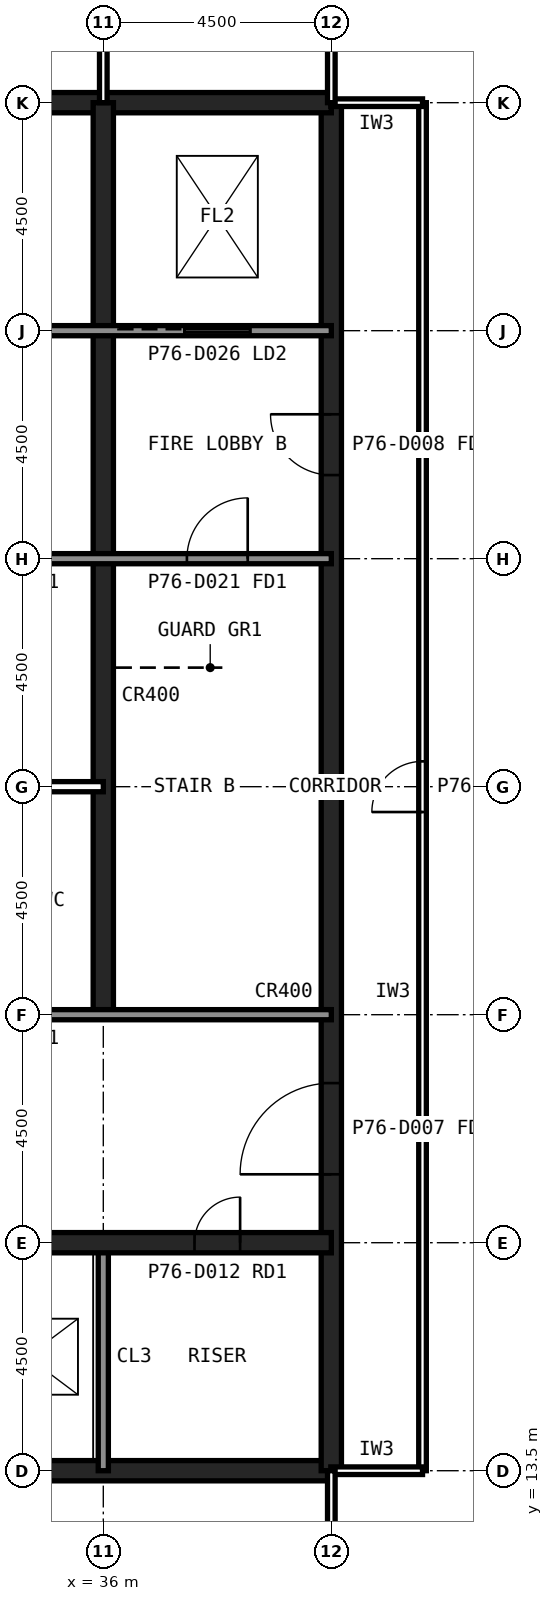
"""IFC4 building model, lengths in metres.
Left out: names, types, materials, properties, quantities, classifications, styles, units other than length and angle.
Written with IfcOpenShell. Run it as: python <this file> out.ifc"""

import sys

from ifc_helpers import new_model, si_unit, direction, frame, frame_2d, origin, place, context, subcontext, project, spatial, polyline, rectangle, outline, extrude, element, fill, save


model = new_model("IFC4")
c1 = context("Model", 3, precision=1e-05, world=origin(), true_north=direction((0.0, 1.0)))
c2 = subcontext(c1, "Body", "Model", "MODEL_VIEW")
j1 = project(units=[si_unit("LENGTHUNIT", "METRE"), si_unit("PLANEANGLEUNIT", "RADIAN")], contexts=[c1])
p1 = place(None, origin())
s1 = spatial("IfcSite", under=j1, at=p1, CompositionType="ELEMENT")
p2 = place(p1, origin())
s2 = spatial("IfcBuilding", under=s1, at=p2, CompositionType="ELEMENT")
p3 = place(p2, frame((0.0, 0.0, 320.1)))
s3 = spatial("IfcBuildingStorey", under=s2, at=p3, CompositionType="ELEMENT", Elevation=320.1)
p4 = place(p3, frame((13.5, 13.5, 0.0), z_axis=(0.0, 0.0, 1.0), x_axis=(1.0, 0.0, 0.0)))
e1 = element("IfcWall", 1, at=p4, inside=s3, PredefinedType="SHEAR", context=c2, shape_type="SweptSolid", body=[
    extrude(rectangle(XDim=27.0, YDim=0.4, at=frame_2d((13.5, 0.0))), origin(), (0.0, 0.0, 1.0), 9.277),
])
p5 = place(p3, frame((40.5, 13.5, 0.0), z_axis=(0.0, 0.0, 1.0), x_axis=(0.0, 1.0, 0.0)))
e2 = element("IfcWall", 2, at=p5, inside=s3, PredefinedType="SHEAR", context=c2, shape_type="SweptSolid", body=[
    extrude(outline(polyline([(0.0, 0.0), (27.0, 0.0), (27.0, 17.377), (0.0, 9.277), (0.0, 0.0)])), frame((0.0, 0.2, 0.0), z_axis=(0.0, -1.0, 0.0), x_axis=(1.0, 0.0, 0.0)), (0.0, 0.0, 1.0), 0.4),
])
p6 = place(p5, frame((5.85, 0.0, 0.0)))
e3 = element("IfcOpeningElement", 3, at=p6, cuts=e2, PredefinedType="OPENING", context=c2, shape_type="SweptSolid", body=[
    extrude(rectangle(XDim=1.8, YDim=2.1, at=frame_2d((0.9, 1.05))), frame((0.0, 0.21, 0.0), z_axis=(0.0, -1.0, 0.0), x_axis=(1.0, 0.0, 0.0)), (0.0, 0.0, 1.0), 0.42),
])
p7 = place(p5, frame((19.65, 0.0, 0.0)))
e4 = element("IfcOpeningElement", 4, at=p7, cuts=e2, PredefinedType="OPENING", context=c2, shape_type="SweptSolid", body=[
    extrude(rectangle(XDim=1.2, YDim=2.1, at=frame_2d((0.6, 1.05))), frame((0.0, 0.21, 0.0), z_axis=(0.0, -1.0, 0.0), x_axis=(1.0, 0.0, 0.0)), (0.0, 0.0, 1.0), 0.42),
])
p8 = place(p3, frame((40.5, 40.5, 0.0), z_axis=(0.0, 0.0, 1.0), x_axis=(-1.0, 0.0, 0.0)))
e5 = element("IfcWall", 5, at=p8, inside=s3, PredefinedType="SHEAR", context=c2, shape_type="SweptSolid", body=[
    extrude(rectangle(XDim=27.0, YDim=0.4, at=frame_2d((13.5, 0.0))), origin(), (0.0, 0.0, 1.0), 17.377),
])
p9 = place(p3, frame((36.0, 13.5, 0.0), z_axis=(0.0, 0.0, 1.0), x_axis=(0.0, 1.0, 0.0)))
e6 = element("IfcWall", 6, at=p9, inside=s3, PredefinedType="SOLIDWALL", context=c2, shape_type="SweptSolid", body=[
    extrude(outline(polyline([(0.0, 0.0), (4.5, 0.0), (4.5, 10.477), (0.0, 9.127), (0.0, 0.0)])), frame((0.0, 0.1, 0.0), z_axis=(0.0, -1.0, 0.0), x_axis=(1.0, 0.0, 0.0)), (0.0, 0.0, 1.0), 0.2),
])
p10 = place(p3, frame((36.0, 22.5, 0.0), z_axis=(0.0, 0.0, 1.0), x_axis=(0.0, 1.0, 0.0)))
e7 = element("IfcWall", 7, at=p10, inside=s3, PredefinedType="SHEAR", context=c2, shape_type="SweptSolid", body=[
    extrude(outline(polyline([(0.0, 0.0), (18.0, 0.0), (18.0, 17.377), (0.0, 11.977), (0.0, 0.0)])), frame((0.0, 0.2, 0.0), z_axis=(0.0, -1.0, 0.0), x_axis=(1.0, 0.0, 0.0)), (0.0, 0.0, 1.0), 0.4),
])
p11 = place(p3, frame((13.5, 18.0, 0.0), z_axis=(0.0, 0.0, 1.0), x_axis=(1.0, 0.0, 0.0)))
e8 = element("IfcWall", 8, at=p11, inside=s3, PredefinedType="SHEAR", context=c2, shape_type="SweptSolid", body=[
    extrude(rectangle(XDim=27.0, YDim=0.4, at=frame_2d((13.5, 0.0))), origin(), (0.0, 0.0, 1.0), 10.627),
])
p12 = place(p11, frame((24.3, 0.0, 0.0)))
e9 = element("IfcOpeningElement", 9, at=p12, cuts=e8, PredefinedType="OPENING", context=c2, shape_type="SweptSolid", body=[
    extrude(rectangle(XDim=0.9, YDim=2.1, at=frame_2d((0.45, 1.05))), frame((0.0, 0.21, 0.0), z_axis=(0.0, -1.0, 0.0), x_axis=(1.0, 0.0, 0.0)), (0.0, 0.0, 1.0), 0.42),
])
p13 = place(p11, frame((1.6, 0.0, 0.0)))
e10 = element("IfcOpeningElement", 10, at=p13, cuts=e8, PredefinedType="OPENING", context=c2, shape_type="SweptSolid", body=[
    extrude(rectangle(XDim=1.3, YDim=2.2, at=frame_2d((0.65, 1.1))), frame((0.0, 0.21, 0.0), z_axis=(0.0, -1.0, 0.0), x_axis=(1.0, 0.0, 0.0)), (0.0, 0.0, 1.0), 0.42),
])
p14 = place(p3, frame((13.5, 36.0, 0.0), z_axis=(0.0, 0.0, 1.0), x_axis=(1.0, 0.0, 0.0)))
e11 = element("IfcWall", 11, at=p14, inside=s3, PredefinedType="SOLIDWALL", context=c2, shape_type="SweptSolid", body=[
    extrude(rectangle(XDim=27.0, YDim=0.2, at=frame_2d((13.5, 0.0))), origin(), (0.0, 0.0, 1.0), 15.877),
])
p15 = place(p14, frame((1.8, 0.0, 0.0)))
e12 = element("IfcOpeningElement", 12, at=p15, cuts=e11, PredefinedType="OPENING", context=c2, shape_type="SweptSolid", body=[
    extrude(rectangle(XDim=0.9, YDim=2.1, at=frame_2d((0.45, 1.05))), frame((0.0, 0.11, 0.0), z_axis=(0.0, -1.0, 0.0), x_axis=(1.0, 0.0, 0.0)), (0.0, 0.0, 1.0), 0.22),
])
p16 = place(p14, frame((5.55, 0.0, 0.0)))
e13 = element("IfcOpeningElement", 13, at=p16, cuts=e11, PredefinedType="OPENING", context=c2, shape_type="SweptSolid", body=[
    extrude(rectangle(XDim=0.9, YDim=2.1, at=frame_2d((0.45, 1.05))), frame((0.0, 0.11, 0.0), z_axis=(0.0, -1.0, 0.0), x_axis=(1.0, 0.0, 0.0)), (0.0, 0.0, 1.0), 0.22),
])
p17 = place(p14, frame((14.55, 0.0, 0.0)))
e14 = element("IfcOpeningElement", 14, at=p17, cuts=e11, PredefinedType="OPENING", context=c2, shape_type="SweptSolid", body=[
    extrude(rectangle(XDim=0.9, YDim=2.1, at=frame_2d((0.45, 1.05))), frame((0.0, 0.11, 0.0), z_axis=(0.0, -1.0, 0.0), x_axis=(1.0, 0.0, 0.0)), (0.0, 0.0, 1.0), 0.22),
])
p18 = place(p14, frame((17.55, 0.0, 0.0)))
e15 = element("IfcOpeningElement", 15, at=p18, cuts=e11, PredefinedType="OPENING", context=c2, shape_type="SweptSolid", body=[
    extrude(rectangle(XDim=0.9, YDim=2.1, at=frame_2d((0.45, 1.05))), frame((0.0, 0.11, 0.0), z_axis=(0.0, -1.0, 0.0), x_axis=(1.0, 0.0, 0.0)), (0.0, 0.0, 1.0), 0.22),
])
p19 = place(p14, frame((24.1, 0.0, 0.0)))
e16 = element("IfcOpeningElement", 16, at=p19, cuts=e11, PredefinedType="OPENING", context=c2, shape_type="SweptSolid", body=[
    extrude(rectangle(XDim=1.3, YDim=2.2, at=frame_2d((0.65, 1.1))), frame((0.0, 0.11, 0.0), z_axis=(0.0, -1.0, 0.0), x_axis=(1.0, 0.0, 0.0)), (0.0, 0.0, 1.0), 0.22),
])
p20 = place(p3, frame((13.5, 22.5, 0.0), z_axis=(0.0, 0.0, 1.0), x_axis=(1.0, 0.0, 0.0)))
e17 = element("IfcWall", 17, at=p20, inside=s3, PredefinedType="SOLIDWALL", context=c2, shape_type="SweptSolid", body=[
    extrude(rectangle(XDim=27.0, YDim=0.2, at=frame_2d((13.5, 0.0))), origin(), (0.0, 0.0, 1.0), 11.827),
])
p21 = place(p20, frame((1.65, 0.0, 0.0)))
e18 = element("IfcOpeningElement", 18, at=p21, cuts=e17, PredefinedType="OPENING", context=c2, shape_type="SweptSolid", body=[
    extrude(rectangle(XDim=1.2, YDim=2.1, at=frame_2d((0.6, 1.05))), frame((0.0, 0.11, 0.0), z_axis=(0.0, -1.0, 0.0), x_axis=(1.0, 0.0, 0.0)), (0.0, 0.0, 1.0), 0.22),
])
p22 = place(p20, frame((6.025, 0.0, 0.0)))
e19 = element("IfcOpeningElement", 19, at=p22, cuts=e17, PredefinedType="OPENING", context=c2, shape_type="SweptSolid", body=[
    extrude(rectangle(XDim=1.0, YDim=2.1, at=frame_2d((0.5, 1.05))), frame((0.0, 0.11, 0.0), z_axis=(0.0, -1.0, 0.0), x_axis=(1.0, 0.0, 0.0)), (0.0, 0.0, 1.0), 0.22),
])
p23 = place(p20, frame((10.525, 0.0, 0.0)))
e20 = element("IfcOpeningElement", 20, at=p23, cuts=e17, PredefinedType="OPENING", context=c2, shape_type="SweptSolid", body=[
    extrude(rectangle(XDim=1.0, YDim=2.1, at=frame_2d((0.5, 1.05))), frame((0.0, 0.11, 0.0), z_axis=(0.0, -1.0, 0.0), x_axis=(1.0, 0.0, 0.0)), (0.0, 0.0, 1.0), 0.22),
])
p24 = place(p20, frame((19.75, 0.0, 0.0)))
e21 = element("IfcOpeningElement", 21, at=p24, cuts=e17, PredefinedType="OPENING", context=c2, shape_type="SweptSolid", body=[
    extrude(rectangle(XDim=1.0, YDim=2.1, at=frame_2d((0.5, 1.05))), frame((0.0, 0.11, 0.0), z_axis=(0.0, -1.0, 0.0), x_axis=(1.0, 0.0, 0.0)), (0.0, 0.0, 1.0), 0.22),
])
p25 = place(p20, frame((15.05, 0.0, 0.0)))
e22 = element("IfcOpeningElement", 22, at=p25, cuts=e17, PredefinedType="OPENING", context=c2, shape_type="SweptSolid", body=[
    extrude(rectangle(XDim=1.4, YDim=2.4, at=frame_2d((0.7, 1.2))), frame((0.0, 0.11, 0.0), z_axis=(0.0, -1.0, 0.0), x_axis=(1.0, 0.0, 0.0)), (0.0, 0.0, 1.0), 0.22),
])
p26 = place(p3, frame((13.5, 31.5, 0.0), z_axis=(0.0, 0.0, 1.0), x_axis=(1.0, 0.0, 0.0)))
e23 = element("IfcWall", 23, at=p26, inside=s3, PredefinedType="SOLIDWALL", context=c2, shape_type="SweptSolid", body=[
    extrude(rectangle(XDim=27.0, YDim=0.2, at=frame_2d((13.5, 0.0))), origin(), (0.0, 0.0, 1.0), 14.527),
])
p27 = place(p26, frame((24.15, 0.0, 0.0)))
e24 = element("IfcOpeningElement", 24, at=p27, cuts=e23, PredefinedType="OPENING", context=c2, shape_type="SweptSolid", body=[
    extrude(rectangle(XDim=1.2, YDim=2.1, at=frame_2d((0.6, 1.05))), frame((0.0, 0.11, 0.0), z_axis=(0.0, -1.0, 0.0), x_axis=(1.0, 0.0, 0.0)), (0.0, 0.0, 1.0), 0.22),
])
p28 = place(p26, frame((15.3, 0.0, 0.0)))
e25 = element("IfcOpeningElement", 25, at=p28, cuts=e23, PredefinedType="OPENING", context=c2, shape_type="SweptSolid", body=[
    extrude(rectangle(XDim=0.9, YDim=2.1, at=frame_2d((0.45, 1.05))), frame((0.0, 0.11, 0.0), z_axis=(0.0, -1.0, 0.0), x_axis=(1.0, 0.0, 0.0)), (0.0, 0.0, 1.0), 0.22),
])
p29 = place(p26, frame((19.8, 0.0, 0.0)))
e26 = element("IfcOpeningElement", 26, at=p29, cuts=e23, PredefinedType="OPENING", context=c2, shape_type="SweptSolid", body=[
    extrude(rectangle(XDim=0.9, YDim=2.1, at=frame_2d((0.45, 1.05))), frame((0.0, 0.11, 0.0), z_axis=(0.0, -1.0, 0.0), x_axis=(1.0, 0.0, 0.0)), (0.0, 0.0, 1.0), 0.22),
])
p30 = place(p3, frame((36.261, 54.63, 0.0), z_axis=(0.0, 0.0, 1.0), x_axis=(0.707106781187, -0.707106781187, 0.0)))
e27 = element("IfcWall", 27, at=p30, inside=s3, PredefinedType="SOLIDWALL", context=c2, shape_type="SweptSolid", body=[
    extrude(outline(polyline([(0.0, 0.0), (25.978, 0.0), (25.978, 18.278), (0.0, 23.789), (0.0, 0.0)])), frame((0.0, 0.15, 0.0), z_axis=(0.0, -1.0, 0.0), x_axis=(1.0, 0.0, 0.0)), (0.0, 0.0, 1.0), 0.3),
])
p31 = place(p30, frame((0.424, 0.0, 1.2)))
e28 = element("IfcOpeningElement", 28, at=p31, cuts=e27, PredefinedType="OPENING", context=c2, shape_type="SweptSolid", body=[
    extrude(rectangle(XDim=2.4, YDim=2.4, at=frame_2d((1.2, 1.2))), frame((0.0, 0.16, 0.0), z_axis=(0.0, -1.0, 0.0), x_axis=(1.0, 0.0, 0.0)), (0.0, 0.0, 1.0), 0.32),
])
p32 = place(p30, frame((3.671, 0.0, 1.2)))
e29 = element("IfcOpeningElement", 29, at=p32, cuts=e27, PredefinedType="OPENING", context=c2, shape_type="SweptSolid", body=[
    extrude(rectangle(XDim=2.4, YDim=2.4, at=frame_2d((1.2, 1.2))), frame((0.0, 0.16, 0.0), z_axis=(0.0, -1.0, 0.0), x_axis=(1.0, 0.0, 0.0)), (0.0, 0.0, 1.0), 0.32),
])
p33 = place(p30, frame((6.918, 0.0, 11.3)))
e30 = element("IfcOpeningElement", 30, at=p33, cuts=e27, PredefinedType="OPENING", context=c2, shape_type="SweptSolid", body=[
    extrude(rectangle(XDim=2.4, YDim=2.4, at=frame_2d((1.2, 1.2))), frame((0.0, 0.16, 0.0), z_axis=(0.0, -1.0, 0.0), x_axis=(1.0, 0.0, 0.0)), (0.0, 0.0, 1.0), 0.32),
])
p34 = place(p30, frame((10.165, 0.0, 11.15)))
e31 = element("IfcOpeningElement", 31, at=p34, cuts=e27, PredefinedType="OPENING", context=c2, shape_type="SweptSolid", body=[
    extrude(rectangle(XDim=2.4, YDim=2.4, at=frame_2d((1.2, 1.2))), frame((0.0, 0.16, 0.0), z_axis=(0.0, -1.0, 0.0), x_axis=(1.0, 0.0, 0.0)), (0.0, 0.0, 1.0), 0.32),
])
p35 = place(p30, frame((13.412, 0.0, 1.2)))
e32 = element("IfcOpeningElement", 32, at=p35, cuts=e27, PredefinedType="OPENING", context=c2, shape_type="SweptSolid", body=[
    extrude(rectangle(XDim=2.4, YDim=2.4, at=frame_2d((1.2, 1.2))), frame((0.0, 0.16, 0.0), z_axis=(0.0, -1.0, 0.0), x_axis=(1.0, 0.0, 0.0)), (0.0, 0.0, 1.0), 0.32),
])
p36 = place(p30, frame((16.66, 0.0, 1.2)))
e33 = element("IfcOpeningElement", 33, at=p36, cuts=e27, PredefinedType="OPENING", context=c2, shape_type="SweptSolid", body=[
    extrude(rectangle(XDim=2.4, YDim=2.4, at=frame_2d((1.2, 1.2))), frame((0.0, 0.16, 0.0), z_axis=(0.0, -1.0, 0.0), x_axis=(1.0, 0.0, 0.0)), (0.0, 0.0, 1.0), 0.32),
])
p37 = place(p30, frame((19.907, 0.0, 1.2)))
e34 = element("IfcOpeningElement", 34, at=p37, cuts=e27, PredefinedType="OPENING", context=c2, shape_type="SweptSolid", body=[
    extrude(rectangle(XDim=2.4, YDim=2.4, at=frame_2d((1.2, 1.2))), frame((0.0, 0.16, 0.0), z_axis=(0.0, -1.0, 0.0), x_axis=(1.0, 0.0, 0.0)), (0.0, 0.0, 1.0), 0.32),
])
p38 = place(p30, frame((23.154, 0.0, 1.2)))
e35 = element("IfcOpeningElement", 35, at=p38, cuts=e27, PredefinedType="OPENING", context=c2, shape_type="SweptSolid", body=[
    extrude(rectangle(XDim=2.4, YDim=2.4, at=frame_2d((1.2, 1.2))), frame((0.0, 0.16, 0.0), z_axis=(0.0, -1.0, 0.0), x_axis=(1.0, 0.0, 0.0)), (0.0, 0.0, 1.0), 0.32),
])
p39 = place(p3, frame((54.63, 17.739, 0.0), z_axis=(0.0, 0.0, 1.0), x_axis=(-0.707106781187, -0.707106781187, 0.0)))
e36 = element("IfcWall", 36, at=p39, inside=s3, PredefinedType="SOLIDWALL", context=c2, shape_type="SweptSolid", body=[
    extrude(outline(polyline([(0.0, 0.0), (25.978, 0.0), (25.978, 7.211), (0.0, 12.722), (0.0, 0.0)])), frame((0.0, 0.15, 0.0), z_axis=(0.0, -1.0, 0.0), x_axis=(1.0, 0.0, 0.0)), (0.0, 0.0, 1.0), 0.3),
])
p40 = place(p39, frame((0.424, 0.0, 1.2)))
e37 = element("IfcOpeningElement", 37, at=p40, cuts=e36, PredefinedType="OPENING", context=c2, shape_type="SweptSolid", body=[
    extrude(rectangle(XDim=2.4, YDim=2.4, at=frame_2d((1.2, 1.2))), frame((0.0, 0.16, 0.0), z_axis=(0.0, -1.0, 0.0), x_axis=(1.0, 0.0, 0.0)), (0.0, 0.0, 1.0), 0.32),
])
p41 = place(p39, frame((3.671, 0.0, 1.2)))
e38 = element("IfcOpeningElement", 38, at=p41, cuts=e36, PredefinedType="OPENING", context=c2, shape_type="SweptSolid", body=[
    extrude(rectangle(XDim=2.4, YDim=2.4, at=frame_2d((1.2, 1.2))), frame((0.0, 0.16, 0.0), z_axis=(0.0, -1.0, 0.0), x_axis=(1.0, 0.0, 0.0)), (0.0, 0.0, 1.0), 0.32),
])
p42 = place(p39, frame((6.918, 0.0, 5.35)))
e39 = element("IfcOpeningElement", 39, at=p42, cuts=e36, PredefinedType="OPENING", context=c2, shape_type="SweptSolid", body=[
    extrude(rectangle(XDim=2.4, YDim=2.4, at=frame_2d((1.2, 1.2))), frame((0.0, 0.16, 0.0), z_axis=(0.0, -1.0, 0.0), x_axis=(1.0, 0.0, 0.0)), (0.0, 0.0, 1.0), 0.32),
])
p43 = place(p39, frame((10.165, 0.0, 5.25)))
e40 = element("IfcOpeningElement", 40, at=p43, cuts=e36, PredefinedType="OPENING", context=c2, shape_type="SweptSolid", body=[
    extrude(rectangle(XDim=2.4, YDim=2.4, at=frame_2d((1.2, 1.2))), frame((0.0, 0.16, 0.0), z_axis=(0.0, -1.0, 0.0), x_axis=(1.0, 0.0, 0.0)), (0.0, 0.0, 1.0), 0.32),
])
p44 = place(p39, frame((13.412, 0.0, 1.2)))
e41 = element("IfcOpeningElement", 41, at=p44, cuts=e36, PredefinedType="OPENING", context=c2, shape_type="SweptSolid", body=[
    extrude(rectangle(XDim=2.4, YDim=2.4, at=frame_2d((1.2, 1.2))), frame((0.0, 0.16, 0.0), z_axis=(0.0, -1.0, 0.0), x_axis=(1.0, 0.0, 0.0)), (0.0, 0.0, 1.0), 0.32),
])
p45 = place(p39, frame((16.66, 0.0, 1.2)))
e42 = element("IfcOpeningElement", 42, at=p45, cuts=e36, PredefinedType="OPENING", context=c2, shape_type="SweptSolid", body=[
    extrude(rectangle(XDim=2.4, YDim=2.4, at=frame_2d((1.2, 1.2))), frame((0.0, 0.16, 0.0), z_axis=(0.0, -1.0, 0.0), x_axis=(1.0, 0.0, 0.0)), (0.0, 0.0, 1.0), 0.32),
])
p46 = place(p39, frame((19.907, 0.0, 1.2)))
e43 = element("IfcOpeningElement", 43, at=p46, cuts=e36, PredefinedType="OPENING", context=c2, shape_type="SweptSolid", body=[
    extrude(rectangle(XDim=2.4, YDim=2.4, at=frame_2d((1.2, 1.2))), frame((0.0, 0.16, 0.0), z_axis=(0.0, -1.0, 0.0), x_axis=(1.0, 0.0, 0.0)), (0.0, 0.0, 1.0), 0.32),
])
p47 = place(p39, frame((23.154, 0.0, 1.2)))
e44 = element("IfcOpeningElement", 44, at=p47, cuts=e36, PredefinedType="OPENING", context=c2, shape_type="SweptSolid", body=[
    extrude(rectangle(XDim=2.4, YDim=2.4, at=frame_2d((1.2, 1.2))), frame((0.0, 0.16, 0.0), z_axis=(0.0, -1.0, 0.0), x_axis=(1.0, 0.0, 0.0)), (0.0, 0.0, 1.0), 0.32),
])
p48 = place(p3, frame((27.0, 27.0, 0.0), z_axis=(0.0, 0.0, 1.0), x_axis=(1.0, 0.0, 0.0)))
e45 = element("IfcWall", 45, at=p48, inside=s3, PredefinedType="PARTITIONING", context=c2, shape_type="SweptSolid", body=[
    extrude(rectangle(XDim=9.0, YDim=0.2, at=frame_2d((4.5, 0.0))), origin(), (0.0, 0.0, 1.0), 4.2),
])
p49 = place(p3, frame((42.3, 13.5, 0.0), z_axis=(0.0, 0.0, 1.0), x_axis=(0.0, 1.0, 0.0)))
e46 = element("IfcWall", 46, at=p49, inside=s3, PredefinedType="PARTITIONING", context=c2, shape_type="SweptSolid", body=[
    extrude(rectangle(XDim=27.0, YDim=0.15, at=frame_2d((13.5, 0.0))), origin(), (0.0, 0.0, 1.0), 4.246),
])
p50 = place(p49, frame((13.0, 0.0, 0.0)))
e47 = element("IfcOpeningElement", 47, at=p50, cuts=e46, PredefinedType="OPENING", context=c2, shape_type="SweptSolid", body=[
    extrude(rectangle(XDim=1.0, YDim=2.1, at=frame_2d((0.5, 1.05))), frame((0.0, 0.085, 0.0), z_axis=(0.0, -1.0, 0.0), x_axis=(1.0, 0.0, 0.0)), (0.0, 0.0, 1.0), 0.17),
])
for number, where, z_axis, x_axis in (
    (48, (40.49, 13.5, 0.0), (0.0, 0.0, 1.0), (1.0, 0.0, 0.0)),
    (49, (42.3, 40.5, 0.0), (0.0, 0.0, 1.0), (-1.0, 0.0, 0.0)),
):
    element("IfcWall", number, at=place(p3, frame(where, z_axis=z_axis, x_axis=x_axis)), inside=s3, PredefinedType="PARTITIONING", context=c2, shape_type="SweptSolid", body=[
        extrude(rectangle(XDim=1.81, YDim=0.15, at=frame_2d((0.905, 0.0))), origin(), (0.0, 0.0, 1.0), 4.246),
    ])
p51 = place(p3, frame((36.0, 40.5, 0.0), z_axis=(0.0, 0.0, 1.0), x_axis=(0.0, 1.0, 0.0)))
e50 = element("IfcWall", 50, at=p51, inside=s3, PredefinedType="PARTITIONING", context=c2, shape_type="SweptSolid", body=[
    extrude(rectangle(XDim=4.5, YDim=0.15, at=frame_2d((2.25, 0.0))), origin(), (0.0, 0.0, 1.0), 4.246),
])
p52 = place(p3, frame((40.5, 49.08, 0.0), z_axis=(0.0, 0.0, 1.0), x_axis=(0.0, -1.0, 0.0)))
e51 = element("IfcWall", 51, at=p52, inside=s3, PredefinedType="PARTITIONING", context=c2, shape_type="SweptSolid", body=[
    extrude(rectangle(XDim=8.58, YDim=0.15, at=frame_2d((4.29, 0.0))), origin(), (0.0, 0.0, 1.0), 4.246),
])
p53 = place(p52, frame((3.79, 0.0, 0.0)))
e52 = element("IfcOpeningElement", 52, at=p53, cuts=e51, PredefinedType="OPENING", context=c2, shape_type="SweptSolid", body=[
    extrude(rectangle(XDim=1.0, YDim=2.1, at=frame_2d((0.5, 1.05))), frame((0.0, 0.085, 0.0), z_axis=(0.0, -1.0, 0.0), x_axis=(1.0, 0.0, 0.0)), (0.0, 0.0, 1.0), 0.17),
])
p54 = place(p3, frame((40.5, 4.92, 0.0), z_axis=(0.0, 0.0, 1.0), x_axis=(0.0, 1.0, 0.0)))
e53 = element("IfcWall", 53, at=p54, inside=s3, PredefinedType="PARTITIONING", context=c2, shape_type="SweptSolid", body=[
    extrude(rectangle(XDim=8.58, YDim=0.15, at=frame_2d((4.29, 0.0))), origin(), (0.0, 0.0, 1.0), 4.246),
])
p55 = place(p54, frame((3.79, 0.0, 0.0)))
e54 = element("IfcOpeningElement", 54, at=p55, cuts=e53, PredefinedType="OPENING", context=c2, shape_type="SweptSolid", body=[
    extrude(rectangle(XDim=1.0, YDim=2.1, at=frame_2d((0.5, 1.05))), frame((0.0, 0.085, 0.0), z_axis=(0.0, -1.0, 0.0), x_axis=(1.0, 0.0, 0.0)), (0.0, 0.0, 1.0), 0.17),
])
p56 = place(p6, origin())
e55 = element("IfcDoor", 55, at=p56, inside=s3, OperationType="SINGLE_SWING_LEFT", PredefinedType="DOOR", context=c2, shape_type="SweptSolid", body=[
    extrude(rectangle(XDim=1.8, YDim=2.1, at=frame_2d((0.9, 1.05))), frame((0.0, 0.025, 0.0), z_axis=(0.0, -1.0, 0.0), x_axis=(1.0, 0.0, 0.0)), (0.0, 0.0, 1.0), 0.05),
])
fill(e3, e55)
p57 = place(p7, origin())
e56 = element("IfcDoor", 56, at=p57, inside=s3, OperationType="SINGLE_SWING_RIGHT", PredefinedType="DOOR", context=c2, shape_type="SweptSolid", body=[
    extrude(rectangle(XDim=1.2, YDim=2.1, at=frame_2d((0.6, 1.05))), frame((0.0, 0.025, 0.0), z_axis=(0.0, -1.0, 0.0), x_axis=(1.0, 0.0, 0.0)), (0.0, 0.0, 1.0), 0.05),
])
fill(e4, e56)
p58 = place(p27, origin())
e57 = element("IfcDoor", 57, at=p58, inside=s3, OperationType="SINGLE_SWING_RIGHT", PredefinedType="DOOR", context=c2, shape_type="SweptSolid", body=[
    extrude(rectangle(XDim=1.2, YDim=2.1, at=frame_2d((0.6, 1.05))), frame((0.0, 0.025, 0.0), z_axis=(0.0, -1.0, 0.0), x_axis=(1.0, 0.0, 0.0)), (0.0, 0.0, 1.0), 0.05),
])
fill(e24, e57)
p59 = place(p12, origin())
e58 = element("IfcDoor", 58, at=p59, inside=s3, OperationType="SINGLE_SWING_RIGHT", PredefinedType="DOOR", context=c2, shape_type="SweptSolid", body=[
    extrude(rectangle(XDim=0.9, YDim=2.1, at=frame_2d((0.45, 1.05))), frame((0.0, 0.025, 0.0), z_axis=(0.0, -1.0, 0.0), x_axis=(1.0, 0.0, 0.0)), (0.0, 0.0, 1.0), 0.05),
])
fill(e9, e58)
p60 = place(p19, origin())
e59 = element("IfcDoor", 59, at=p60, inside=s3, OperationType="SLIDING_TO_LEFT", PredefinedType="DOOR", context=c2, shape_type="SweptSolid", body=[
    extrude(rectangle(XDim=1.3, YDim=2.2, at=frame_2d((0.65, 1.1))), frame((0.0, 0.025, 0.0), z_axis=(0.0, -1.0, 0.0), x_axis=(1.0, 0.0, 0.0)), (0.0, 0.0, 1.0), 0.05),
])
fill(e16, e59)
p61 = place(p50, origin())
e60 = element("IfcDoor", 60, at=p61, inside=s3, OperationType="SINGLE_SWING_LEFT", PredefinedType="DOOR", context=c2, shape_type="SweptSolid", body=[
    extrude(rectangle(XDim=1.0, YDim=2.1, at=frame_2d((0.5, 1.05))), frame((0.0, 0.025, 0.0), z_axis=(0.0, -1.0, 0.0), x_axis=(1.0, 0.0, 0.0)), (0.0, 0.0, 1.0), 0.05),
])
fill(e47, e60)
save(model, sys.argv[1])
